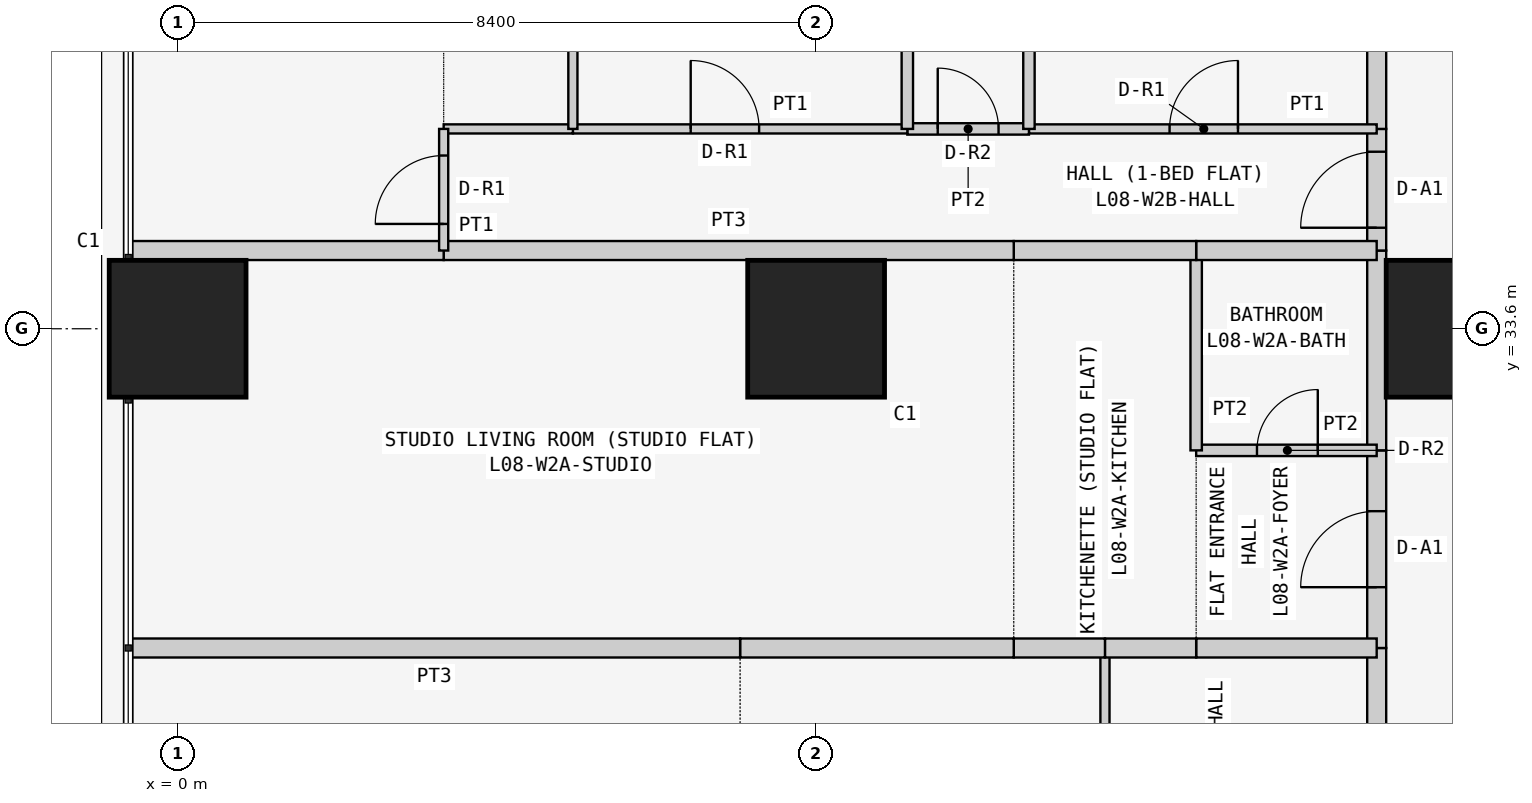
"""IFC4 building model, lengths in metres.
Left out: names, types, materials, properties, quantities, classifications, styles, units other than length and angle.
Written with IfcOpenShell. Run it as: python <this file> out.ifc"""

import sys

from ifc_helpers import new_model, si_unit, direction, frame, frame_2d, origin, origin_2d, place, context, subcontext, project, spatial, rectangle, extrude, element, fill, save


model = new_model("IFC4")
c1 = context("Model", 3, precision=1e-05, world=origin(), true_north=direction((0.0, 1.0)))
c2 = subcontext(c1, "Body", "Model", "MODEL_VIEW")
j1 = project(units=[si_unit("LENGTHUNIT", "METRE"), si_unit("PLANEANGLEUNIT", "RADIAN")], contexts=[c1])
p1 = place(None, origin())
s1 = spatial("IfcSite", under=j1, at=p1, CompositionType="ELEMENT")
p2 = place(p1, origin())
s2 = spatial("IfcBuilding", under=s1, at=p2, CompositionType="ELEMENT")
p3 = place(p2, frame((0.0, 0.0, 38.1)))
s3 = spatial("IfcBuildingStorey", under=s2, at=p3, CompositionType="ELEMENT", Elevation=38.1)
for number, where, z_axis, x_axis in (
    (1, (0.0, 33.6, 0.0), (0.0, 0.0, 1.0), (1.0, 0.0, 0.0)),
    (2, (8.4, 33.6, 0.0), (0.0, 0.0, 1.0), (1.0, 0.0, 0.0)),
    (3, (16.8, 33.6, 0.0), (0.0, 0.0, 1.0), (1.0, 0.0, 0.0)),
):
    element("IfcColumn", number, at=place(p3, frame(where, z_axis=z_axis, x_axis=x_axis)), inside=s3, PredefinedType="COLUMN", context=c2, shape_type="SweptSolid", body=[
        extrude(rectangle(XDim=1.8, YDim=1.8, at=origin_2d()), origin(), (0.0, 0.0, 1.0), 3.6),
    ])
p4 = place(p3, frame((15.775, 24.171, 0.0), z_axis=(0.0, 0.0, 1.0), x_axis=(0.0, 1.0, 0.0)))
e4 = element("IfcWall", 4, at=p4, inside=s3, PredefinedType="PARTITIONING", context=c2, shape_type="SweptSolid", body=[
    extrude(rectangle(XDim=5.229, YDim=0.25, at=frame_2d((2.615, 0.0))), origin(), (0.0, 0.0, 1.0), 3.45),
])
p5 = place(p4, frame((2.129, 0.0, 0.0)))
e5 = element("IfcOpeningElement", 5, at=p5, cuts=e4, PredefinedType="OPENING", context=c2, shape_type="SweptSolid", body=[
    extrude(rectangle(XDim=1.0, YDim=2.1, at=frame_2d((0.5, 1.05))), frame((0.0, 0.135, 0.0), z_axis=(0.0, -1.0, 0.0), x_axis=(1.0, 0.0, 0.0)), (0.0, 0.0, 1.0), 0.27),
])
p6 = place(p3, frame((15.775, 29.4, 0.0), z_axis=(0.0, 0.0, 1.0), x_axis=(0.0, 1.0, 0.0)))
e6 = element("IfcWall", 6, at=p6, inside=s3, PredefinedType="PARTITIONING", context=c2, shape_type="SweptSolid", body=[
    extrude(rectangle(XDim=2.6, YDim=0.25, at=frame_2d((1.3, 0.0))), origin(), (0.0, 0.0, 1.0), 3.45),
])
p7 = place(p6, frame((0.8, 0.0, 0.0)))
e7 = element("IfcOpeningElement", 7, at=p7, cuts=e6, PredefinedType="OPENING", context=c2, shape_type="SweptSolid", body=[
    extrude(rectangle(XDim=1.0, YDim=2.1, at=frame_2d((0.5, 1.05))), frame((0.0, 0.135, 0.0), z_axis=(0.0, -1.0, 0.0), x_axis=(1.0, 0.0, 0.0)), (0.0, 0.0, 1.0), 0.27),
])
p8 = place(p3, frame((15.775, 32.0, 0.0), z_axis=(0.0, 0.0, 1.0), x_axis=(0.0, 1.0, 0.0)))
e8 = element("IfcWall", 8, at=p8, inside=s3, PredefinedType="PARTITIONING", context=c2, shape_type="SweptSolid", body=[
    extrude(rectangle(XDim=2.629, YDim=0.25, at=frame_2d((1.314, 0.0))), origin(), (0.0, 0.0, 1.0), 3.45),
])
p9 = place(p3, frame((15.775, 34.629, 0.0), z_axis=(0.0, 0.0, 1.0), x_axis=(0.0, 1.0, 0.0)))
e9 = element("IfcWall", 9, at=p9, inside=s3, PredefinedType="PARTITIONING", context=c2, shape_type="SweptSolid", body=[
    extrude(rectangle(XDim=1.6, YDim=0.25, at=frame_2d((0.8, 0.0))), origin(), (0.0, 0.0, 1.0), 3.45),
])
p10 = place(p9, frame((0.3, 0.0, 0.0)))
e10 = element("IfcOpeningElement", 10, at=p10, cuts=e9, PredefinedType="OPENING", context=c2, shape_type="SweptSolid", body=[
    extrude(rectangle(XDim=1.0, YDim=2.1, at=frame_2d((0.5, 1.05))), frame((0.0, 0.135, 0.0), z_axis=(0.0, -1.0, 0.0), x_axis=(1.0, 0.0, 0.0)), (0.0, 0.0, 1.0), 0.27),
])
p11 = place(p3, frame((15.775, 36.229, 0.0), z_axis=(0.0, 0.0, 1.0), x_axis=(0.0, 1.0, 0.0)))
e11 = element("IfcWall", 11, at=p11, inside=s3, PredefinedType="PARTITIONING", context=c2, shape_type="SweptSolid", body=[
    extrude(rectangle(XDim=6.471, YDim=0.25, at=frame_2d((3.235, 0.0))), origin(), (0.0, 0.0, 1.0), 3.45),
])
p12 = place(p3, frame((12.2, 29.4, 0.0), z_axis=(0.0, 0.0, 1.0), x_axis=(0.0, -1.0, 0.0)))
e12 = element("IfcWall", 12, at=p12, inside=s3, PredefinedType="PARTITIONING", context=c2, shape_type="SweptSolid", body=[
    extrude(rectangle(XDim=5.229, YDim=0.12, at=frame_2d((2.615, 0.0))), origin(), (0.0, 0.0, 1.0), 3.45),
])
p13 = place(p12, frame((1.05, 0.0, 0.0)))
e13 = element("IfcOpeningElement", 13, at=p13, cuts=e12, PredefinedType="OPENING", context=c2, shape_type="SweptSolid", body=[
    extrude(rectangle(XDim=0.9, YDim=2.1, at=frame_2d((0.45, 1.05))), frame((0.0, 0.07, 0.0), z_axis=(0.0, -1.0, 0.0), x_axis=(1.0, 0.0, 0.0)), (0.0, 0.0, 1.0), 0.14),
])
p14 = place(p3, frame((15.775, 29.4, 0.0), z_axis=(0.0, 0.0, 1.0), x_axis=(-1.0, 0.0, 0.0)))
e14 = element("IfcWall", 14, at=p14, inside=s3, PredefinedType="PARTITIONING", context=c2, shape_type="SweptSolid", body=[
    extrude(rectangle(XDim=2.375, YDim=0.25, at=frame_2d((1.188, 0.0))), origin(), (0.0, 0.0, 1.0), 3.45),
])
for number, where, z_axis, x_axis in (
    (15, (13.4, 29.4, 0.0), (0.0, 0.0, 1.0), (-1.0, 0.0, 0.0)),
    (16, (12.2, 29.4, 0.0), (0.0, 0.0, 1.0), (-1.0, 0.0, 0.0)),
):
    element("IfcWall", number, at=place(p3, frame(where, z_axis=z_axis, x_axis=x_axis)), inside=s3, PredefinedType="PARTITIONING", context=c2, shape_type="SweptSolid", body=[
        extrude(rectangle(XDim=1.2, YDim=0.25, at=frame_2d((0.6, 0.0))), origin(), (0.0, 0.0, 1.0), 3.45),
    ])
p15 = place(p3, frame((11.0, 29.4, 0.0), z_axis=(0.0, 0.0, 1.0), x_axis=(-1.0, 0.0, 0.0)))
e17 = element("IfcWall", 17, at=p15, inside=s3, PredefinedType="PARTITIONING", context=c2, shape_type="SweptSolid", body=[
    extrude(rectangle(XDim=3.6, YDim=0.25, at=frame_2d((1.8, 0.0))), origin(), (0.0, 0.0, 1.0), 3.45),
])
p16 = place(p3, frame((7.4, 29.4, 0.0), z_axis=(0.0, 0.0, 1.0), x_axis=(-1.0, 0.0, 0.0)))
e18 = element("IfcWall", 18, at=p16, inside=s3, PredefinedType="PARTITIONING", context=c2, shape_type="SweptSolid", body=[
    extrude(rectangle(XDim=8.05, YDim=0.25, at=frame_2d((4.025, 0.0))), origin(), (0.0, 0.0, 1.0), 3.45),
])
p17 = place(p3, frame((13.4, 32.0, 0.0), z_axis=(0.0, 0.0, 1.0), x_axis=(1.0, 0.0, 0.0)))
e19 = element("IfcWall", 19, at=p17, inside=s3, PredefinedType="PARTITIONING", context=c2, shape_type="SweptSolid", body=[
    extrude(rectangle(XDim=2.375, YDim=0.15, at=frame_2d((1.188, 0.0))), origin(), (0.0, 0.0, 1.0), 3.45),
])
p18 = place(p17, frame((0.8, 0.0, 0.0)))
e20 = element("IfcOpeningElement", 20, at=p18, cuts=e19, PredefinedType="OPENING", context=c2, shape_type="SweptSolid", body=[
    extrude(rectangle(XDim=0.8, YDim=2.1, at=frame_2d((0.4, 1.05))), frame((0.0, 0.085, 0.0), z_axis=(0.0, -1.0, 0.0), x_axis=(1.0, 0.0, 0.0)), (0.0, 0.0, 1.0), 0.17),
])
p19 = place(p3, frame((13.4, 32.0, 0.0), z_axis=(0.0, 0.0, 1.0), x_axis=(0.0, 1.0, 0.0)))
e21 = element("IfcWall", 21, at=p19, inside=s3, PredefinedType="PARTITIONING", context=c2, shape_type="SweptSolid", body=[
    extrude(rectangle(XDim=2.629, YDim=0.15, at=frame_2d((1.314, 0.0))), origin(), (0.0, 0.0, 1.0), 3.45),
])
p20 = place(p3, frame((13.4, 34.629, 0.0), z_axis=(0.0, 0.0, 1.0), x_axis=(1.0, 0.0, 0.0)))
e22 = element("IfcWall", 22, at=p20, inside=s3, PredefinedType="PARTITIONING", context=c2, shape_type="SweptSolid", body=[
    extrude(rectangle(XDim=2.375, YDim=0.25, at=frame_2d((1.188, 0.0))), origin(), (0.0, 0.0, 1.0), 3.45),
])
p21 = place(p3, frame((11.0, 34.629, 0.0), z_axis=(0.0, 0.0, 1.0), x_axis=(1.0, 0.0, 0.0)))
e23 = element("IfcWall", 23, at=p21, inside=s3, PredefinedType="PARTITIONING", context=c2, shape_type="SweptSolid", body=[
    extrude(rectangle(XDim=2.4, YDim=0.25, at=frame_2d((1.2, 0.0))), origin(), (0.0, 0.0, 1.0), 3.45),
])
p22 = place(p3, frame((3.5, 34.629, 0.0), z_axis=(0.0, 0.0, 1.0), x_axis=(1.0, 0.0, 0.0)))
e24 = element("IfcWall", 24, at=p22, inside=s3, PredefinedType="PARTITIONING", context=c2, shape_type="SweptSolid", body=[
    extrude(rectangle(XDim=7.5, YDim=0.25, at=frame_2d((3.75, 0.0))), origin(), (0.0, 0.0, 1.0), 3.45),
])
p23 = place(p3, frame((-0.65, 34.629, 0.0), z_axis=(0.0, 0.0, 1.0), x_axis=(1.0, 0.0, 0.0)))
e25 = element("IfcWall", 25, at=p23, inside=s3, PredefinedType="PARTITIONING", context=c2, shape_type="SweptSolid", body=[
    extrude(rectangle(XDim=4.15, YDim=0.25, at=frame_2d((2.075, 0.0))), origin(), (0.0, 0.0, 1.0), 3.45),
])
p24 = place(p3, frame((11.2, 36.229, 0.0), z_axis=(0.0, 0.0, 1.0), x_axis=(1.0, 0.0, 0.0)))
e26 = element("IfcWall", 26, at=p24, inside=s3, PredefinedType="PARTITIONING", context=c2, shape_type="SweptSolid", body=[
    extrude(rectangle(XDim=4.575, YDim=0.12, at=frame_2d((2.288, 0.0))), origin(), (0.0, 0.0, 1.0), 3.45),
])
p25 = place(p24, frame((1.85, 0.0, 0.0)))
e27 = element("IfcOpeningElement", 27, at=p25, cuts=e26, PredefinedType="OPENING", context=c2, shape_type="SweptSolid", body=[
    extrude(rectangle(XDim=0.9, YDim=2.1, at=frame_2d((0.45, 1.05))), frame((0.0, 0.07, 0.0), z_axis=(0.0, -1.0, 0.0), x_axis=(1.0, 0.0, 0.0)), (0.0, 0.0, 1.0), 0.14),
])
p26 = place(p3, frame((9.6, 36.229, 0.0), z_axis=(0.0, 0.0, 1.0), x_axis=(1.0, 0.0, 0.0)))
e28 = element("IfcWall", 28, at=p26, inside=s3, PredefinedType="PARTITIONING", context=c2, shape_type="SweptSolid", body=[
    extrude(rectangle(XDim=1.6, YDim=0.15, at=frame_2d((0.8, 0.0))), origin(), (0.0, 0.0, 1.0), 3.45),
])
p27 = place(p26, frame((0.4, 0.0, 0.0)))
e29 = element("IfcOpeningElement", 29, at=p27, cuts=e28, PredefinedType="OPENING", context=c2, shape_type="SweptSolid", body=[
    extrude(rectangle(XDim=0.8, YDim=2.1, at=frame_2d((0.4, 1.05))), frame((0.0, 0.085, 0.0), z_axis=(0.0, -1.0, 0.0), x_axis=(1.0, 0.0, 0.0)), (0.0, 0.0, 1.0), 0.17),
])
p28 = place(p3, frame((5.2, 36.229, 0.0), z_axis=(0.0, 0.0, 1.0), x_axis=(1.0, 0.0, 0.0)))
e30 = element("IfcWall", 30, at=p28, inside=s3, PredefinedType="PARTITIONING", context=c2, shape_type="SweptSolid", body=[
    extrude(rectangle(XDim=4.4, YDim=0.12, at=frame_2d((2.2, 0.0))), origin(), (0.0, 0.0, 1.0), 3.45),
])
p29 = place(p28, frame((1.55, 0.0, 0.0)))
e31 = element("IfcOpeningElement", 31, at=p29, cuts=e30, PredefinedType="OPENING", context=c2, shape_type="SweptSolid", body=[
    extrude(rectangle(XDim=0.9, YDim=2.1, at=frame_2d((0.45, 1.05))), frame((0.0, 0.07, 0.0), z_axis=(0.0, -1.0, 0.0), x_axis=(1.0, 0.0, 0.0)), (0.0, 0.0, 1.0), 0.14),
])
p30 = place(p3, frame((3.5, 36.229, 0.0), z_axis=(0.0, 0.0, 1.0), x_axis=(1.0, 0.0, 0.0)))
e32 = element("IfcWall", 32, at=p30, inside=s3, PredefinedType="PARTITIONING", context=c2, shape_type="SweptSolid", body=[
    extrude(rectangle(XDim=1.7, YDim=0.12, at=frame_2d((0.85, 0.0))), origin(), (0.0, 0.0, 1.0), 3.45),
])
p31 = place(p3, frame((3.5, 34.629, 0.0), z_axis=(0.0, 0.0, 1.0), x_axis=(0.0, 1.0, 0.0)))
e33 = element("IfcWall", 33, at=p31, inside=s3, PredefinedType="PARTITIONING", context=c2, shape_type="SweptSolid", body=[
    extrude(rectangle(XDim=1.6, YDim=0.12, at=frame_2d((0.8, 0.0))), origin(), (0.0, 0.0, 1.0), 3.45),
])
p32 = place(p31, frame((0.35, 0.0, 0.0)))
e34 = element("IfcOpeningElement", 34, at=p32, cuts=e33, PredefinedType="OPENING", context=c2, shape_type="SweptSolid", body=[
    extrude(rectangle(XDim=0.9, YDim=2.1, at=frame_2d((0.45, 1.05))), frame((0.0, 0.07, 0.0), z_axis=(0.0, -1.0, 0.0), x_axis=(1.0, 0.0, 0.0)), (0.0, 0.0, 1.0), 0.14),
])
for number, where, z_axis, x_axis in (
    (35, (11.2, 36.229, 0.0), (0.0, 0.0, 1.0), (0.0, 1.0, 0.0)),
    (36, (9.6, 36.229, 0.0), (0.0, 0.0, 1.0), (0.0, 1.0, 0.0)),
):
    element("IfcWall", number, at=place(p3, frame(where, z_axis=z_axis, x_axis=x_axis)), inside=s3, PredefinedType="PARTITIONING", context=c2, shape_type="SweptSolid", body=[
        extrude(rectangle(XDim=6.471, YDim=0.15, at=frame_2d((3.235, 0.0))), origin(), (0.0, 0.0, 1.0), 3.45),
    ])
p33 = place(p3, frame((5.2, 36.229, 0.0), z_axis=(0.0, 0.0, 1.0), x_axis=(0.0, 1.0, 0.0)))
e37 = element("IfcWall", 37, at=p33, inside=s3, PredefinedType="PARTITIONING", context=c2, shape_type="SweptSolid", body=[
    extrude(rectangle(XDim=6.471, YDim=0.12, at=frame_2d((3.235, 0.0))), origin(), (0.0, 0.0, 1.0), 3.45),
])
p34 = place(p7, origin())
e38 = element("IfcDoor", 38, at=p34, inside=s3, OperationType="SINGLE_SWING_LEFT", PredefinedType="DOOR", context=c2, shape_type="SweptSolid", body=[
    extrude(rectangle(XDim=1.0, YDim=2.1, at=frame_2d((0.5, 1.05))), frame((0.0, 0.025, 0.0), z_axis=(0.0, -1.0, 0.0), x_axis=(1.0, 0.0, 0.0)), (0.0, 0.0, 1.0), 0.05),
])
fill(e7, e38)
p35 = place(p18, origin())
e39 = element("IfcDoor", 39, at=p35, inside=s3, OperationType="SINGLE_SWING_RIGHT", PredefinedType="DOOR", context=c2, shape_type="SweptSolid", body=[
    extrude(rectangle(XDim=0.8, YDim=2.1, at=frame_2d((0.4, 1.05))), frame((0.0, 0.025, 0.0), z_axis=(0.0, -1.0, 0.0), x_axis=(1.0, 0.0, 0.0)), (0.0, 0.0, 1.0), 0.05),
])
fill(e20, e39)
p36 = place(p10, origin())
e40 = element("IfcDoor", 40, at=p36, inside=s3, OperationType="SINGLE_SWING_LEFT", PredefinedType="DOOR", context=c2, shape_type="SweptSolid", body=[
    extrude(rectangle(XDim=1.0, YDim=2.1, at=frame_2d((0.5, 1.05))), frame((0.0, 0.025, 0.0), z_axis=(0.0, -1.0, 0.0), x_axis=(1.0, 0.0, 0.0)), (0.0, 0.0, 1.0), 0.05),
])
fill(e10, e40)
p37 = place(p25, origin())
e41 = element("IfcDoor", 41, at=p37, inside=s3, OperationType="SINGLE_SWING_RIGHT", PredefinedType="DOOR", context=c2, shape_type="SweptSolid", body=[
    extrude(rectangle(XDim=0.9, YDim=2.1, at=frame_2d((0.45, 1.05))), frame((0.0, 0.025, 0.0), z_axis=(0.0, -1.0, 0.0), x_axis=(1.0, 0.0, 0.0)), (0.0, 0.0, 1.0), 0.05),
])
fill(e27, e41)
p38 = place(p27, origin())
e42 = element("IfcDoor", 42, at=p38, inside=s3, OperationType="SINGLE_SWING_LEFT", PredefinedType="DOOR", context=c2, shape_type="SweptSolid", body=[
    extrude(rectangle(XDim=0.8, YDim=2.1, at=frame_2d((0.4, 1.05))), frame((0.0, 0.025, 0.0), z_axis=(0.0, -1.0, 0.0), x_axis=(1.0, 0.0, 0.0)), (0.0, 0.0, 1.0), 0.05),
])
fill(e29, e42)
p39 = place(p29, origin())
e43 = element("IfcDoor", 43, at=p39, inside=s3, OperationType="SINGLE_SWING_LEFT", PredefinedType="DOOR", context=c2, shape_type="SweptSolid", body=[
    extrude(rectangle(XDim=0.9, YDim=2.1, at=frame_2d((0.45, 1.05))), frame((0.0, 0.025, 0.0), z_axis=(0.0, -1.0, 0.0), x_axis=(1.0, 0.0, 0.0)), (0.0, 0.0, 1.0), 0.05),
])
fill(e31, e43)
p40 = place(p32, origin())
e44 = element("IfcDoor", 44, at=p40, inside=s3, OperationType="SINGLE_SWING_LEFT", PredefinedType="DOOR", context=c2, shape_type="SweptSolid", body=[
    extrude(rectangle(XDim=0.9, YDim=2.1, at=frame_2d((0.45, 1.05))), frame((0.0, 0.025, 0.0), z_axis=(0.0, -1.0, 0.0), x_axis=(1.0, 0.0, 0.0)), (0.0, 0.0, 1.0), 0.05),
])
fill(e34, e44)
save(model, sys.argv[1])
